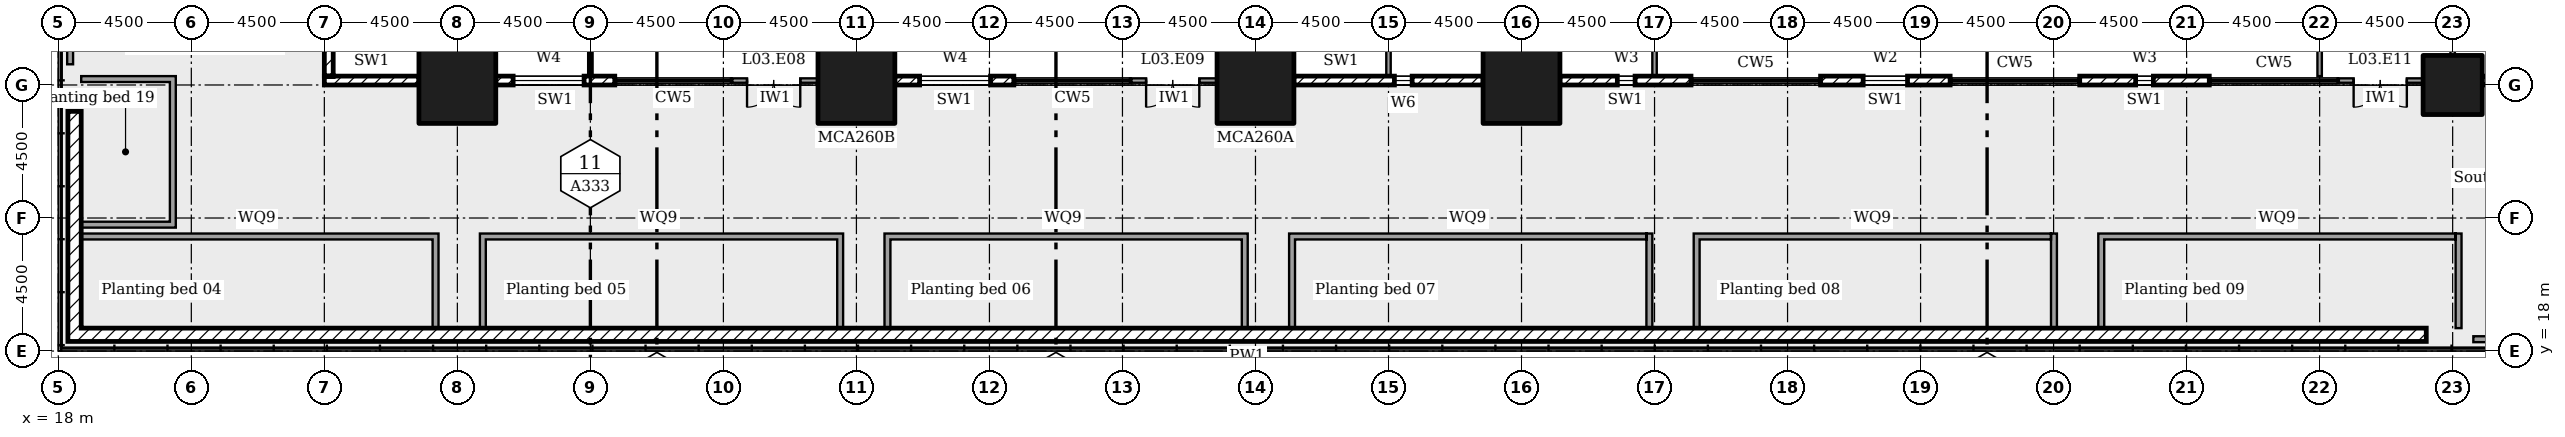
"""IFC4 building model, lengths in metres.
Left out: names, types, materials, properties, quantities, classifications, styles, units other than length and angle.
Written with IfcOpenShell. Run it as: python <this file> out.ifc"""

import sys

from ifc_helpers import new_model, si_unit, direction, frame, frame_2d, origin, origin_2d, place, context, subcontext, project, spatial, rectangle, extrude, element, fill, save


model = new_model("IFC4")
c1 = context("Model", 3, precision=1e-05, world=origin(), true_north=direction((0.0, 1.0)))
c2 = subcontext(c1, "Body", "Model", "MODEL_VIEW")
j1 = project(units=[si_unit("LENGTHUNIT", "METRE"), si_unit("PLANEANGLEUNIT", "RADIAN")], contexts=[c1])
p1 = place(None, origin())
s1 = spatial("IfcSite", under=j1, at=p1, CompositionType="ELEMENT")
p2 = place(p1, origin())
s2 = spatial("IfcBuilding", under=s1, at=p2, CompositionType="ELEMENT")
p3 = place(p2, frame((0.0, 0.0, 16.5)))
s3 = spatial("IfcBuildingStorey", under=s2, at=p3, CompositionType="ELEMENT", Elevation=16.5)
for number, where in (
    (1, (31.5, 27.0, 0.0)),
    (2, (45.0, 27.0, 0.0)),
    (3, (58.5, 27.0, 0.0)),
    (4, (67.5, 27.0, 0.0)),
):
    element("IfcColumn", number, at=place(p3, frame(where)), inside=s3, PredefinedType="COLUMN", context=c2, shape_type="SweptSolid", body=[
        extrude(rectangle(XDim=2.6, YDim=2.6, at=origin_2d()), origin(), (0.0, 0.0, 1.0), 4.5),
    ])
p4 = place(p3, frame((99.0, 27.0, 0.0)))
e5 = element("IfcColumn", 5, at=p4, inside=s3, PredefinedType="COLUMN", context=c2, shape_type="SweptSolid", body=[
    extrude(rectangle(XDim=2.0, YDim=2.0, at=origin_2d()), origin(), (0.0, 0.0, 1.0), 4.5),
])
p5 = place(p3, frame((27.0, 27.15, 0.0)))
e6 = element("IfcWall", 6, at=p5, inside=s3, PredefinedType="ELEMENTEDWALL", context=c2, shape_type="SweptSolid", body=[
    extrude(rectangle(XDim=3.2, YDim=0.3, at=frame_2d((1.6, 0.0))), origin(), (0.0, 0.0, 1.0), 4.05),
])
p6 = place(p3, frame((32.8, 27.15, 0.0)))
e7 = element("IfcWall", 7, at=p6, inside=s3, PredefinedType="ELEMENTEDWALL", context=c2, shape_type="SweptSolid", body=[
    extrude(rectangle(XDim=4.025, YDim=0.3, at=frame_2d((2.012, 0.0))), origin(), (0.0, 0.0, 1.0), 2.25),
])
p7 = place(p6, frame((0.587, 0.0, 0.45)))
e8 = element("IfcOpeningElement", 8, at=p7, cuts=e7, PredefinedType="OPENING", context=c2, shape_type="SweptSolid", body=[
    extrude(rectangle(XDim=2.4, YDim=1.7, at=frame_2d((1.2, 0.85))), frame((0.0, 0.16, 0.0), z_axis=(0.0, -1.0, 0.0), x_axis=(1.0, 0.0, 0.0)), (0.0, 0.0, 1.0), 0.32),
])
p8 = place(p3, frame((40.8, 27.15, 0.0)))
e9 = element("IfcWall", 9, at=p8, inside=s3, PredefinedType="SOLIDWALL", context=c2, shape_type="SweptSolid", body=[
    extrude(rectangle(XDim=2.9, YDim=0.15, at=frame_2d((1.45, 0.0))), origin(), (0.0, 0.0, 1.0), 2.25),
])
p9 = place(p8, frame((0.5, 0.0, 0.0)))
e10 = element("IfcOpeningElement", 10, at=p9, cuts=e9, PredefinedType="OPENING", context=c2, shape_type="SweptSolid", body=[
    extrude(rectangle(XDim=1.8, YDim=2.1, at=frame_2d((0.9, 1.05))), frame((0.0, 0.085, 0.0), z_axis=(0.0, -1.0, 0.0), x_axis=(1.0, 0.0, 0.0)), (0.0, 0.0, 1.0), 0.17),
])
p10 = place(p3, frame((46.3, 27.15, 0.0)))
e11 = element("IfcWall", 11, at=p10, inside=s3, PredefinedType="ELEMENTEDWALL", context=c2, shape_type="SweptSolid", body=[
    extrude(rectangle(XDim=4.025, YDim=0.3, at=frame_2d((2.012, 0.0))), origin(), (0.0, 0.0, 1.0), 2.25),
])
p11 = place(p10, frame((0.837, 0.0, 0.45)))
e12 = element("IfcOpeningElement", 12, at=p11, cuts=e11, PredefinedType="OPENING", context=c2, shape_type="SweptSolid", body=[
    extrude(rectangle(XDim=2.4, YDim=1.7, at=frame_2d((1.2, 0.85))), frame((0.0, 0.16, 0.0), z_axis=(0.0, -1.0, 0.0), x_axis=(1.0, 0.0, 0.0)), (0.0, 0.0, 1.0), 0.32),
])
p12 = place(p3, frame((54.3, 27.15, 0.0)))
e13 = element("IfcWall", 13, at=p12, inside=s3, PredefinedType="SOLIDWALL", context=c2, shape_type="SweptSolid", body=[
    extrude(rectangle(XDim=2.9, YDim=0.15, at=frame_2d((1.45, 0.0))), origin(), (0.0, 0.0, 1.0), 2.25),
])
p13 = place(p12, frame((0.5, 0.0, 0.0)))
e14 = element("IfcOpeningElement", 14, at=p13, cuts=e13, PredefinedType="OPENING", context=c2, shape_type="SweptSolid", body=[
    extrude(rectangle(XDim=1.8, YDim=2.1, at=frame_2d((0.9, 1.05))), frame((0.0, 0.085, 0.0), z_axis=(0.0, -1.0, 0.0), x_axis=(1.0, 0.0, 0.0)), (0.0, 0.0, 1.0), 0.17),
])
p14 = place(p3, frame((59.8, 27.15, 0.0)))
e15 = element("IfcWall", 15, at=p14, inside=s3, PredefinedType="ELEMENTEDWALL", context=c2, shape_type="SweptSolid", body=[
    extrude(rectangle(XDim=6.4, YDim=0.3, at=frame_2d((3.2, 0.0))), origin(), (0.0, 0.0, 1.0), 2.25),
])
p15 = place(p14, frame((3.4, 0.0, 0.45)))
e16 = element("IfcOpeningElement", 16, at=p15, cuts=e15, PredefinedType="OPENING", context=c2, shape_type="SweptSolid", body=[
    extrude(rectangle(XDim=0.6, YDim=1.7, at=frame_2d((0.3, 0.85))), frame((0.0, 0.16, 0.0), z_axis=(0.0, -1.0, 0.0), x_axis=(1.0, 0.0, 0.0)), (0.0, 0.0, 1.0), 0.32),
])
p16 = place(p3, frame((68.8, 27.15, 0.0)))
e17 = element("IfcWall", 17, at=p16, inside=s3, PredefinedType="ELEMENTEDWALL", context=c2, shape_type="SweptSolid", body=[
    extrude(rectangle(XDim=4.433, YDim=0.3, at=frame_2d((2.217, 0.0))), origin(), (0.0, 0.0, 1.0), 4.05),
])
p17 = place(p16, frame((1.942, 0.0, 0.45)))
e18 = element("IfcOpeningElement", 18, at=p17, cuts=e17, PredefinedType="OPENING", context=c2, shape_type="SweptSolid", body=[
    extrude(rectangle(XDim=0.6, YDim=2.4, at=frame_2d((0.3, 1.2))), frame((0.0, 0.16, 0.0), z_axis=(0.0, -1.0, 0.0), x_axis=(1.0, 0.0, 0.0)), (0.0, 0.0, 1.0), 0.32),
])
p18 = place(p3, frame((77.617, 27.15, 0.0)))
e19 = element("IfcWall", 19, at=p18, inside=s3, PredefinedType="ELEMENTEDWALL", context=c2, shape_type="SweptSolid", body=[
    extrude(rectangle(XDim=4.383, YDim=0.3, at=frame_2d((2.192, 0.0))), origin(), (0.0, 0.0, 1.0), 4.05),
])
p19 = place(p18, frame((1.442, 0.0, 0.9)))
e20 = element("IfcOpeningElement", 20, at=p19, cuts=e19, PredefinedType="OPENING", context=c2, shape_type="SweptSolid", body=[
    extrude(rectangle(XDim=1.5, YDim=1.8, at=frame_2d((0.75, 0.9))), frame((0.0, 0.16, 0.0), z_axis=(0.0, -1.0, 0.0), x_axis=(1.0, 0.0, 0.0)), (0.0, 0.0, 1.0), 0.32),
])
p20 = place(p3, frame((86.383, 27.15, 0.0)))
e21 = element("IfcWall", 21, at=p20, inside=s3, PredefinedType="ELEMENTEDWALL", context=c2, shape_type="SweptSolid", body=[
    extrude(rectangle(XDim=4.383, YDim=0.3, at=frame_2d((2.192, 0.0))), origin(), (0.0, 0.0, 1.0), 4.05),
])
p21 = place(p20, frame((1.892, 0.0, 0.45)))
e22 = element("IfcOpeningElement", 22, at=p21, cuts=e21, PredefinedType="OPENING", context=c2, shape_type="SweptSolid", body=[
    extrude(rectangle(XDim=0.6, YDim=2.4, at=frame_2d((0.3, 1.2))), frame((0.0, 0.16, 0.0), z_axis=(0.0, -1.0, 0.0), x_axis=(1.0, 0.0, 0.0)), (0.0, 0.0, 1.0), 0.32),
])
p22 = place(p3, frame((95.15, 27.15, 0.0)))
e23 = element("IfcWall", 23, at=p22, inside=s3, PredefinedType="SOLIDWALL", context=c2, shape_type="SweptSolid", body=[
    extrude(rectangle(XDim=2.85, YDim=0.15, at=frame_2d((1.425, 0.0))), origin(), (0.0, 0.0, 1.0), 4.05),
])
p23 = place(p22, frame((0.5, 0.0, 0.0)))
e24 = element("IfcOpeningElement", 24, at=p23, cuts=e23, PredefinedType="OPENING", context=c2, shape_type="SweptSolid", body=[
    extrude(rectangle(XDim=1.8, YDim=2.4, at=frame_2d((0.9, 1.2))), frame((0.0, 0.085, 0.0), z_axis=(0.0, -1.0, 0.0), x_axis=(1.0, 0.0, 0.0)), (0.0, 0.0, 1.0), 0.17),
])
p24 = place(p3, frame((100.0, 27.15, 0.0)))
e25 = element("IfcWall", 25, at=p24, inside=s3, PredefinedType="ELEMENTEDWALL", context=c2, shape_type="SweptSolid", body=[
    extrude(rectangle(XDim=4.25, YDim=0.3, at=frame_2d((2.125, 0.0))), origin(), (0.0, 0.0, 1.0), 2.25),
])
p25 = place(p24, frame((1.85, 0.0, 0.45)))
e26 = element("IfcOpeningElement", 26, at=p25, cuts=e25, PredefinedType="OPENING", context=c2, shape_type="SweptSolid", body=[
    extrude(rectangle(XDim=0.6, YDim=1.7, at=frame_2d((0.3, 0.85))), frame((0.0, 0.16, 0.0), z_axis=(0.0, -1.0, 0.0), x_axis=(1.0, 0.0, 0.0)), (0.0, 0.0, 1.0), 0.32),
])
p26 = place(p3, frame((27.15, 30.2, 0.0), z_axis=(0.0, 0.0, 1.0), x_axis=(0.0, -1.0, 0.0)))
e27 = element("IfcWall", 27, at=p26, inside=s3, PredefinedType="ELEMENTEDWALL", context=c2, shape_type="SweptSolid", body=[
    extrude(rectangle(XDim=2.9, YDim=0.3, at=frame_2d((1.45, 0.0))), origin(), (0.0, 0.0, 1.0), 4.05),
])
p27 = place(p3, frame((18.325, 18.55, 0.0)))
e28 = element("IfcWall", 28, at=p27, inside=s3, PredefinedType="SOLIDWALL", context=c2, shape_type="SweptSolid", body=[
    extrude(rectangle(XDim=79.782, YDim=0.45, at=frame_2d((39.891, 0.0))), origin(), (0.0, 0.0, 1.0), 0.6),
])
p28 = place(p3, frame((18.55, 26.107, 0.0), z_axis=(0.0, 0.0, 1.0), x_axis=(0.0, -1.0, 0.0)))
e29 = element("IfcWall", 29, at=p28, inside=s3, PredefinedType="SOLIDWALL", context=c2, shape_type="SweptSolid", body=[
    extrude(rectangle(XDim=7.333, YDim=0.45, at=frame_2d((3.666, 0.0))), origin(), (0.0, 0.0, 1.0), 0.6),
])
p29 = place(p3, frame((30.762, 18.775, 0.0), z_axis=(0.0, 0.0, 1.0), x_axis=(0.0, 1.0, 0.0)))
e30 = element("IfcWall", 30, at=p29, inside=s3, PredefinedType="SOLIDWALL", context=c2, shape_type="SweptSolid", body=[
    extrude(rectangle(XDim=3.2, YDim=0.2, at=frame_2d((1.6, 0.0))), origin(), (0.0, 0.0, 1.0), 0.45),
])
p30 = place(p3, frame((18.775, 21.875, 0.0)))
e31 = element("IfcWall", 31, at=p30, inside=s3, PredefinedType="SOLIDWALL", context=c2, shape_type="SweptSolid", body=[
    extrude(rectangle(XDim=11.888, YDim=0.2, at=frame_2d((5.944, 0.0))), origin(), (0.0, 0.0, 1.0), 0.45),
])
p31 = place(p3, frame((44.45, 18.775, 0.0), z_axis=(0.0, 0.0, 1.0), x_axis=(0.0, 1.0, 0.0)))
e32 = element("IfcWall", 32, at=p31, inside=s3, PredefinedType="SOLIDWALL", context=c2, shape_type="SweptSolid", body=[
    extrude(rectangle(XDim=3.2, YDim=0.2, at=frame_2d((1.6, 0.0))), origin(), (0.0, 0.0, 1.0), 0.45),
])
p32 = place(p3, frame((32.262, 21.875, 0.0)))
e33 = element("IfcWall", 33, at=p32, inside=s3, PredefinedType="SOLIDWALL", context=c2, shape_type="SweptSolid", body=[
    extrude(rectangle(XDim=12.088, YDim=0.2, at=frame_2d((6.044, 0.0))), origin(), (0.0, 0.0, 1.0), 0.45),
])
p33 = place(p3, frame((32.363, 18.775, 0.0), z_axis=(0.0, 0.0, 1.0), x_axis=(0.0, 1.0, 0.0)))
e34 = element("IfcWall", 34, at=p33, inside=s3, PredefinedType="SOLIDWALL", context=c2, shape_type="SweptSolid", body=[
    extrude(rectangle(XDim=3.0, YDim=0.2, at=frame_2d((1.5, 0.0))), origin(), (0.0, 0.0, 1.0), 0.45),
])
p34 = place(p3, frame((58.137, 18.775, 0.0), z_axis=(0.0, 0.0, 1.0), x_axis=(0.0, 1.0, 0.0)))
e35 = element("IfcWall", 35, at=p34, inside=s3, PredefinedType="SOLIDWALL", context=c2, shape_type="SweptSolid", body=[
    extrude(rectangle(XDim=3.2, YDim=0.2, at=frame_2d((1.6, 0.0))), origin(), (0.0, 0.0, 1.0), 0.45),
])
p35 = place(p3, frame((45.95, 21.875, 0.0)))
e36 = element("IfcWall", 36, at=p35, inside=s3, PredefinedType="SOLIDWALL", context=c2, shape_type="SweptSolid", body=[
    extrude(rectangle(XDim=12.088, YDim=0.2, at=frame_2d((6.044, 0.0))), origin(), (0.0, 0.0, 1.0), 0.45),
])
p36 = place(p3, frame((46.05, 18.775, 0.0), z_axis=(0.0, 0.0, 1.0), x_axis=(0.0, 1.0, 0.0)))
e37 = element("IfcWall", 37, at=p36, inside=s3, PredefinedType="SOLIDWALL", context=c2, shape_type="SweptSolid", body=[
    extrude(rectangle(XDim=3.0, YDim=0.2, at=frame_2d((1.5, 0.0))), origin(), (0.0, 0.0, 1.0), 0.45),
])
p37 = place(p3, frame((71.825, 18.775, 0.0), z_axis=(0.0, 0.0, 1.0), x_axis=(0.0, 1.0, 0.0)))
e38 = element("IfcWall", 38, at=p37, inside=s3, PredefinedType="SOLIDWALL", context=c2, shape_type="SweptSolid", body=[
    extrude(rectangle(XDim=3.2, YDim=0.2, at=frame_2d((1.6, 0.0))), origin(), (0.0, 0.0, 1.0), 0.45),
])
p38 = place(p3, frame((59.637, 21.875, 0.0)))
e39 = element("IfcWall", 39, at=p38, inside=s3, PredefinedType="SOLIDWALL", context=c2, shape_type="SweptSolid", body=[
    extrude(rectangle(XDim=12.088, YDim=0.2, at=frame_2d((6.044, 0.0))), origin(), (0.0, 0.0, 1.0), 0.45),
])
p39 = place(p3, frame((59.738, 18.775, 0.0), z_axis=(0.0, 0.0, 1.0), x_axis=(0.0, 1.0, 0.0)))
e40 = element("IfcWall", 40, at=p39, inside=s3, PredefinedType="SOLIDWALL", context=c2, shape_type="SweptSolid", body=[
    extrude(rectangle(XDim=3.0, YDim=0.2, at=frame_2d((1.5, 0.0))), origin(), (0.0, 0.0, 1.0), 0.45),
])
p40 = place(p3, frame((85.512, 18.775, 0.0), z_axis=(0.0, 0.0, 1.0), x_axis=(0.0, 1.0, 0.0)))
e41 = element("IfcWall", 41, at=p40, inside=s3, PredefinedType="SOLIDWALL", context=c2, shape_type="SweptSolid", body=[
    extrude(rectangle(XDim=3.2, YDim=0.2, at=frame_2d((1.6, 0.0))), origin(), (0.0, 0.0, 1.0), 0.45),
])
p41 = place(p3, frame((73.325, 21.875, 0.0)))
e42 = element("IfcWall", 42, at=p41, inside=s3, PredefinedType="SOLIDWALL", context=c2, shape_type="SweptSolid", body=[
    extrude(rectangle(XDim=12.088, YDim=0.2, at=frame_2d((6.044, 0.0))), origin(), (0.0, 0.0, 1.0), 0.45),
])
p42 = place(p3, frame((73.425, 18.775, 0.0), z_axis=(0.0, 0.0, 1.0), x_axis=(0.0, 1.0, 0.0)))
e43 = element("IfcWall", 43, at=p42, inside=s3, PredefinedType="SOLIDWALL", context=c2, shape_type="SweptSolid", body=[
    extrude(rectangle(XDim=3.0, YDim=0.2, at=frame_2d((1.5, 0.0))), origin(), (0.0, 0.0, 1.0), 0.45),
])
p43 = place(p3, frame((99.2, 18.775, 0.0), z_axis=(0.0, 0.0, 1.0), x_axis=(0.0, 1.0, 0.0)))
e44 = element("IfcWall", 44, at=p43, inside=s3, PredefinedType="SOLIDWALL", context=c2, shape_type="SweptSolid", body=[
    extrude(rectangle(XDim=3.2, YDim=0.2, at=frame_2d((1.6, 0.0))), origin(), (0.0, 0.0, 1.0), 0.45),
])
p44 = place(p3, frame((87.012, 21.875, 0.0)))
e45 = element("IfcWall", 45, at=p44, inside=s3, PredefinedType="SOLIDWALL", context=c2, shape_type="SweptSolid", body=[
    extrude(rectangle(XDim=12.088, YDim=0.2, at=frame_2d((6.044, 0.0))), origin(), (0.0, 0.0, 1.0), 0.45),
])
p45 = place(p3, frame((87.113, 18.775, 0.0), z_axis=(0.0, 0.0, 1.0), x_axis=(0.0, 1.0, 0.0)))
e46 = element("IfcWall", 46, at=p45, inside=s3, PredefinedType="SOLIDWALL", context=c2, shape_type="SweptSolid", body=[
    extrude(rectangle(XDim=3.0, YDim=0.2, at=frame_2d((1.5, 0.0))), origin(), (0.0, 0.0, 1.0), 0.45),
])
p46 = place(p3, frame((21.875, 22.175, 0.0), z_axis=(0.0, 0.0, 1.0), x_axis=(0.0, 1.0, 0.0)))
e47 = element("IfcWall", 47, at=p46, inside=s3, PredefinedType="SOLIDWALL", context=c2, shape_type="SweptSolid", body=[
    extrude(rectangle(XDim=5.125, YDim=0.2, at=frame_2d((2.562, 0.0))), origin(), (0.0, 0.0, 1.0), 0.45),
])
for number, where in (
    (48, (18.775, 27.2, 0.0)),
    (49, (18.775, 22.275, 0.0)),
):
    element("IfcWall", number, at=place(p3, frame(where)), inside=s3, PredefinedType="SOLIDWALL", context=c2, shape_type="SweptSolid", body=[
        extrude(rectangle(XDim=3.0, YDim=0.2, at=frame_2d((1.5, 0.0))), origin(), (0.0, 0.0, 1.0), 0.45),
    ])
p47 = place(p3, frame((72.0, 27.3, 0.0), z_axis=(0.0, 0.0, 1.0), x_axis=(0.0, 1.0, 0.0)))
e50 = element("IfcWall", 50, at=p47, inside=s3, PredefinedType="PARTITIONING", context=c2, shape_type="SweptSolid", body=[
    extrude(rectangle(XDim=2.905, YDim=0.15, at=frame_2d((1.453, 0.0))), origin(), (0.0, 0.0, 1.0), 4.05),
])
p48 = place(p3, frame((94.5, 27.3, 0.0), z_axis=(0.0, 0.0, 1.0), x_axis=(0.0, 1.0, 0.0)))
e51 = element("IfcWall", 51, at=p48, inside=s3, PredefinedType="PARTITIONING", context=c2, shape_type="SweptSolid", body=[
    extrude(rectangle(XDim=3.205, YDim=0.15, at=frame_2d((1.603, 0.0))), origin(), (0.0, 0.0, 1.0), 4.05),
])
for number, where, z_axis, x_axis in (
    (52, (63.0, 27.3, 0.0), (0.0, 0.0, 1.0), (0.0, 1.0, 0.0)),
    (53, (36.0, 27.3, 0.0), (0.0, 0.0, 1.0), (0.0, 1.0, 0.0)),
):
    element("IfcWall", number, at=place(p3, frame(where, z_axis=z_axis, x_axis=x_axis)), inside=s3, PredefinedType="PARTITIONING", context=c2, shape_type="SweptSolid", body=[
        extrude(rectangle(XDim=8.7, YDim=0.15, at=frame_2d((4.35, 0.0))), origin(), (0.0, 0.0, 1.0), 4.05),
    ])
p49 = place(p3, frame((99.0, 27.995, 0.0), z_axis=(0.0, 0.0, 1.0), x_axis=(0.0, 1.0, 0.0)))
e54 = element("IfcWall", 54, at=p49, inside=s3, PredefinedType="PARTITIONING", context=c2, shape_type="SweptSolid", body=[
    extrude(rectangle(XDim=3.505, YDim=0.15, at=frame_2d((1.752, 0.0))), origin(), (0.0, 0.0, 1.0), 4.05),
])
p50 = place(p3, frame((99.7, 18.4, 0.0)))
e55 = element("IfcWall", 55, at=p50, inside=s3, PredefinedType="SOLIDWALL", context=c2, shape_type="SweptSolid", body=[
    extrude(rectangle(XDim=3.8, YDim=0.2, at=frame_2d((1.9, 0.0))), origin(), (0.0, 0.0, 1.0), 2.3),
])
p51 = place(p50, frame((0.6, 0.0, 0.0)))
e56 = element("IfcOpeningElement", 56, at=p51, cuts=e55, PredefinedType="OPENING", context=c2, shape_type="SweptSolid", body=[
    extrude(rectangle(XDim=2.6, YDim=2.1, at=frame_2d((1.3, 1.05))), frame((0.0, 0.11, 0.0), z_axis=(0.0, -1.0, 0.0), x_axis=(1.0, 0.0, 0.0)), (0.0, 0.0, 1.0), 0.22),
])
p52 = place(p3, frame((18.4, 27.7, 0.0), z_axis=(0.0, 0.0, 1.0), x_axis=(0.0, 1.0, 0.0)))
e57 = element("IfcWall", 57, at=p52, inside=s3, PredefinedType="SOLIDWALL", context=c2, shape_type="SweptSolid", body=[
    extrude(rectangle(XDim=3.8, YDim=0.2, at=frame_2d((1.9, 0.0))), origin(), (0.0, 0.0, 1.0), 2.3),
])
p53 = place(p52, frame((0.6, 0.0, 0.0)))
e58 = element("IfcOpeningElement", 58, at=p53, cuts=e57, PredefinedType="OPENING", context=c2, shape_type="SweptSolid", body=[
    extrude(rectangle(XDim=2.6, YDim=2.1, at=frame_2d((1.3, 1.05))), frame((0.0, 0.11, 0.0), z_axis=(0.0, -1.0, 0.0), x_axis=(1.0, 0.0, 0.0)), (0.0, 0.0, 1.0), 0.22),
])
p54 = place(p7, origin())
e59 = element("IfcWindow", 59, at=p54, inside=s3, PartitioningType="SINGLE_PANEL", PredefinedType="WINDOW", context=c2, shape_type="SweptSolid", body=[
    extrude(rectangle(XDim=2.4, YDim=1.7, at=frame_2d((1.2, 0.85))), frame((0.0, 0.03, 0.0), z_axis=(0.0, -1.0, 0.0), x_axis=(1.0, 0.0, 0.0)), (0.0, 0.0, 1.0), 0.06),
])
fill(e8, e59)
p55 = place(p9, frame((1.8, 0.0, 0.0), x_axis=(-1.0, 0.0, 0.0)))
e60 = element("IfcDoor", 60, at=p55, inside=s3, OperationType="DOUBLE_DOOR_DOUBLE_SWING", PredefinedType="NOTDEFINED", context=c2, shape_type="SweptSolid", body=[
    extrude(rectangle(XDim=1.8, YDim=2.1, at=frame_2d((0.9, 1.05))), frame((0.0, 0.025, 0.0), z_axis=(0.0, -1.0, 0.0), x_axis=(1.0, 0.0, 0.0)), (0.0, 0.0, 1.0), 0.05),
])
fill(e10, e60)
p56 = place(p11, origin())
e61 = element("IfcWindow", 61, at=p56, inside=s3, PartitioningType="SINGLE_PANEL", PredefinedType="WINDOW", context=c2, shape_type="SweptSolid", body=[
    extrude(rectangle(XDim=2.4, YDim=1.7, at=frame_2d((1.2, 0.85))), frame((0.0, 0.03, 0.0), z_axis=(0.0, -1.0, 0.0), x_axis=(1.0, 0.0, 0.0)), (0.0, 0.0, 1.0), 0.06),
])
fill(e12, e61)
p57 = place(p13, frame((1.8, 0.0, 0.0), x_axis=(-1.0, 0.0, 0.0)))
e62 = element("IfcDoor", 62, at=p57, inside=s3, OperationType="DOUBLE_DOOR_DOUBLE_SWING", PredefinedType="NOTDEFINED", context=c2, shape_type="SweptSolid", body=[
    extrude(rectangle(XDim=1.8, YDim=2.1, at=frame_2d((0.9, 1.05))), frame((0.0, 0.025, 0.0), z_axis=(0.0, -1.0, 0.0), x_axis=(1.0, 0.0, 0.0)), (0.0, 0.0, 1.0), 0.05),
])
fill(e14, e62)
p58 = place(p15, origin())
e63 = element("IfcWindow", 63, at=p58, inside=s3, PartitioningType="SINGLE_PANEL", PredefinedType="WINDOW", context=c2, shape_type="SweptSolid", body=[
    extrude(rectangle(XDim=0.6, YDim=1.7, at=frame_2d((0.3, 0.85))), frame((0.0, 0.03, 0.0), z_axis=(0.0, -1.0, 0.0), x_axis=(1.0, 0.0, 0.0)), (0.0, 0.0, 1.0), 0.06),
])
fill(e16, e63)
p59 = place(p17, origin())
e64 = element("IfcWindow", 64, at=p59, inside=s3, PartitioningType="SINGLE_PANEL", PredefinedType="WINDOW", context=c2, shape_type="SweptSolid", body=[
    extrude(rectangle(XDim=0.6, YDim=2.4, at=frame_2d((0.3, 1.2))), frame((0.0, 0.03, 0.0), z_axis=(0.0, -1.0, 0.0), x_axis=(1.0, 0.0, 0.0)), (0.0, 0.0, 1.0), 0.06),
])
fill(e18, e64)
p60 = place(p19, origin())
e65 = element("IfcWindow", 65, at=p60, inside=s3, PartitioningType="SINGLE_PANEL", PredefinedType="WINDOW", context=c2, shape_type="SweptSolid", body=[
    extrude(rectangle(XDim=1.5, YDim=1.8, at=frame_2d((0.75, 0.9))), frame((0.0, 0.03, 0.0), z_axis=(0.0, -1.0, 0.0), x_axis=(1.0, 0.0, 0.0)), (0.0, 0.0, 1.0), 0.06),
])
fill(e20, e65)
p61 = place(p21, origin())
e66 = element("IfcWindow", 66, at=p61, inside=s3, PartitioningType="SINGLE_PANEL", PredefinedType="WINDOW", context=c2, shape_type="SweptSolid", body=[
    extrude(rectangle(XDim=0.6, YDim=2.4, at=frame_2d((0.3, 1.2))), frame((0.0, 0.03, 0.0), z_axis=(0.0, -1.0, 0.0), x_axis=(1.0, 0.0, 0.0)), (0.0, 0.0, 1.0), 0.06),
])
fill(e22, e66)
p62 = place(p23, frame((1.8, 0.0, 0.0), x_axis=(-1.0, 0.0, 0.0)))
e67 = element("IfcDoor", 67, at=p62, inside=s3, OperationType="DOUBLE_DOOR_DOUBLE_SWING", PredefinedType="NOTDEFINED", context=c2, shape_type="SweptSolid", body=[
    extrude(rectangle(XDim=1.8, YDim=2.4, at=frame_2d((0.9, 1.2))), frame((0.0, 0.025, 0.0), z_axis=(0.0, -1.0, 0.0), x_axis=(1.0, 0.0, 0.0)), (0.0, 0.0, 1.0), 0.05),
])
fill(e24, e67)
save(model, sys.argv[1])
